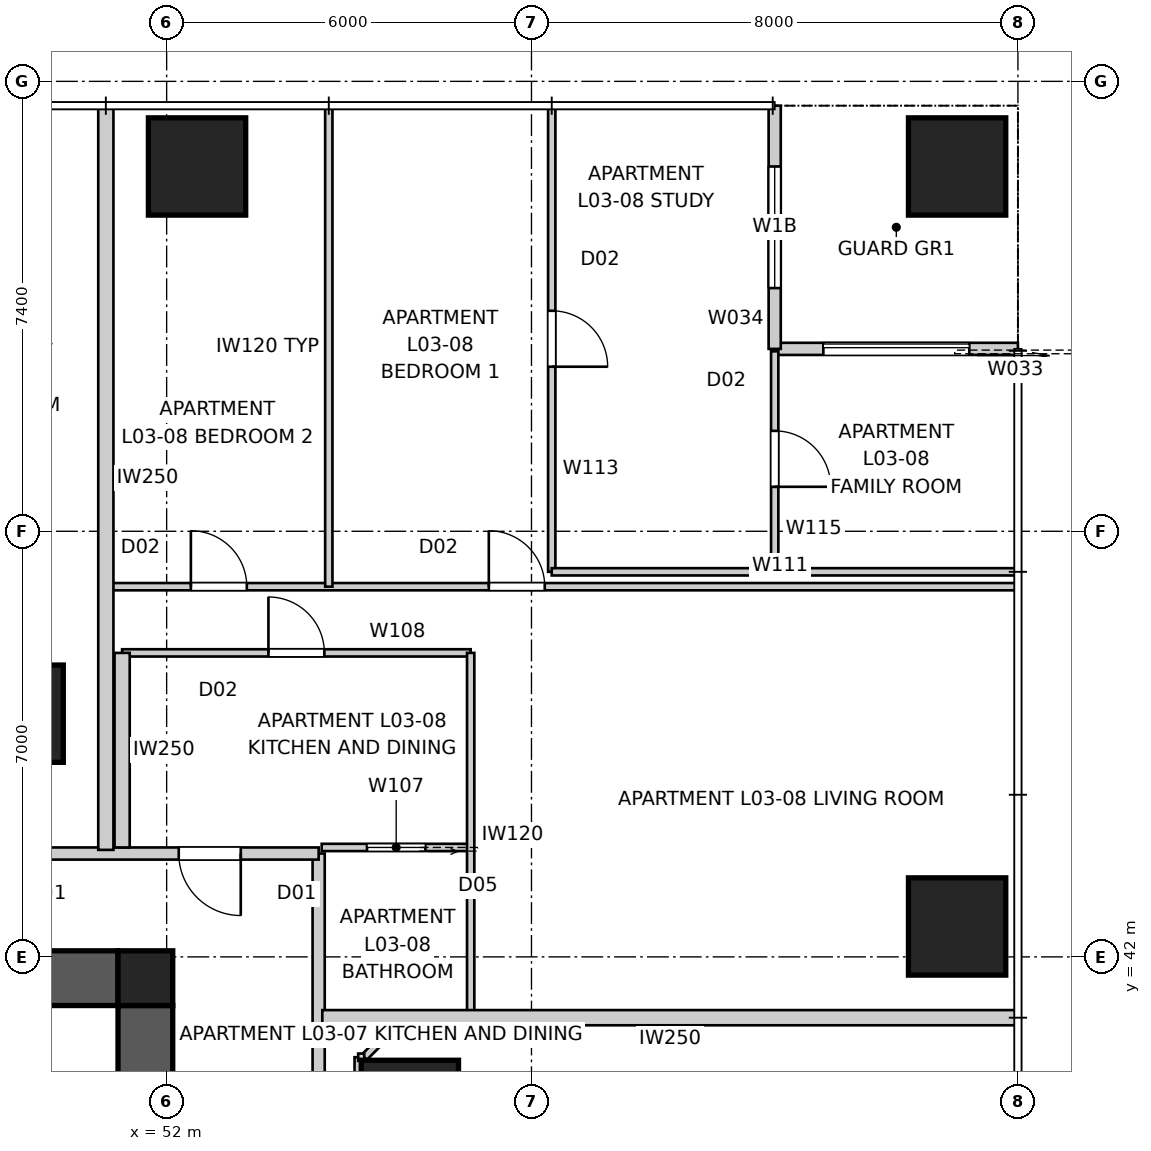
"""IFC4 building model, lengths in metres.
Left out: names, types, materials, properties, quantities, classifications, styles, units other than length and angle.
Written with IfcOpenShell. Run it as: python <this file> out.ifc"""

import sys

from ifc_helpers import new_model, si_unit, direction, frame, frame_2d, origin, origin_2d, place, context, subcontext, project, spatial, polyline, rectangle, outline, extrude, element, fill, save


model = new_model("IFC4")
c1 = context("Model", 3, precision=1e-05, world=origin(), true_north=direction((0.0, 1.0)))
c2 = subcontext(c1, "Body", "Model", "MODEL_VIEW")
j1 = project(units=[si_unit("LENGTHUNIT", "METRE"), si_unit("PLANEANGLEUNIT", "RADIAN")], contexts=[c1])
p1 = place(None, origin())
s1 = spatial("IfcSite", under=j1, at=p1, CompositionType="ELEMENT")
p2 = place(p1, origin())
s2 = spatial("IfcBuilding", under=s1, at=p2, CompositionType="ELEMENT")
p3 = place(p2, frame((0.0, 0.0, 15.0)))
s3 = spatial("IfcBuildingStorey", under=s2, at=p3, CompositionType="ELEMENT", Elevation=15.0)
p4 = place(p3, frame((28.8, 41.65, 0.0), z_axis=(0.0, 0.0, 1.0), x_axis=(1.0, 0.0, 0.0)))
e1 = element("IfcWall", 1, at=p4, inside=s3, PredefinedType="SHEAR", context=c2, shape_type="SweptSolid", body=[
    extrude(outline(polyline([(0.0, -0.45), (22.4, -0.45), (22.4, -0.025), (22.85, -0.025), (22.85, 0.025), (22.4, 0.025), (22.4, 0.45), (0.0, 0.45), (0.0, 0.025), (-0.45, 0.025), (-0.45, -0.025), (0.0, -0.025), (0.0, -0.45)])), origin(), (0.0, 0.0, 1.0), 3.4),
])
p5 = place(p3, frame((51.65, 18.8, 0.0), z_axis=(0.0, 0.0, 1.0), x_axis=(0.0, 1.0, 0.0)))
e2 = element("IfcWall", 2, at=p5, inside=s3, PredefinedType="SHEAR", context=c2, shape_type="SweptSolid", body=[
    extrude(outline(polyline([(0.0, -0.45), (22.4, -0.45), (22.4, -0.025), (22.85, -0.025), (22.85, 0.025), (22.4, 0.025), (22.4, 0.45), (0.0, 0.45), (0.0, 0.025), (-0.45, 0.025), (-0.45, -0.025), (0.0, -0.025), (0.0, -0.45)])), origin(), (0.0, 0.0, 1.0), 3.4),
])
p6 = place(p5, frame((11.14, 0.0, 0.0)))
e3 = element("IfcOpeningElement", 3, at=p6, cuts=e2, PredefinedType="OPENING", context=c2, shape_type="SweptSolid", body=[
    extrude(rectangle(XDim=1.02, YDim=2.4, at=frame_2d((0.51, 1.2))), frame((0.0, 0.46, 0.0), z_axis=(0.0, -1.0, 0.0), x_axis=(1.0, 0.0, 0.0)), (0.0, 0.0, 1.0), 0.92),
])
p7 = place(p3, frame((51.65, 41.65, 0.0), z_axis=(0.0, 0.0, 1.0), x_axis=(1.0, 0.0, 0.0)))
e4 = element("IfcColumn", 4, at=p7, inside=s3, PredefinedType="COLUMN", context=c2, shape_type="SweptSolid", body=[
    extrude(rectangle(XDim=0.9, YDim=0.9, at=origin_2d()), origin(), (0.0, 0.0, 1.0), 3.4),
])
for number, where, z_axis, x_axis in (
    (5, (65.0, 42.5, 0.0), (0.0, 0.0, 1.0), (1.0, 0.0, 0.0)),
    (6, (65.0, 55.0, 0.0), (0.0, 0.0, 1.0), (1.0, 0.0, 0.0)),
    (7, (52.5, 55.0, 0.0), (0.0, 0.0, 1.0), (1.0, 0.0, 0.0)),
    (8, (56.0, 39.5, 0.0), (0.0, 0.0, 1.0), (1.0, 0.0, 0.0)),
    (9, (49.5, 46.0, 0.0), (0.0, 0.0, 1.0), (1.0, 0.0, 0.0)),
):
    element("IfcColumn", number, at=place(p3, frame(where, z_axis=z_axis, x_axis=x_axis)), inside=s3, PredefinedType="COLUMN", context=c2, shape_type="SweptSolid", body=[
        extrude(rectangle(XDim=1.6, YDim=1.6, at=origin_2d()), origin(), (0.0, 0.0, 1.0), 3.4),
    ])
p8 = place(p3, frame((66.0, 52.0, 0.0), z_axis=(0.0, 0.0, 1.0), x_axis=(-1.0, 0.0, 0.0)))
e10 = element("IfcWall", 10, at=p8, inside=s3, PredefinedType="SOLIDWALL", context=c2, shape_type="SweptSolid", body=[
    extrude(rectangle(XDim=4.0, YDim=0.2, at=frame_2d((2.0, 0.0))), origin(), (0.0, 0.0, 1.0), 3.25),
])
p9 = place(p8, frame((0.8, 0.0, 0.0)))
e11 = element("IfcOpeningElement", 11, at=p9, cuts=e10, PredefinedType="OPENING", context=c2, shape_type="SweptSolid", body=[
    extrude(rectangle(XDim=2.4, YDim=2.1, at=frame_2d((1.2, 1.05))), frame((0.0, 0.11, 0.0), z_axis=(0.0, -1.0, 0.0), x_axis=(1.0, 0.0, 0.0)), (0.0, 0.0, 1.0), 0.22),
])
p10 = place(p3, frame((62.0, 52.0, 0.0), z_axis=(0.0, 0.0, 1.0), x_axis=(0.0, 1.0, 0.0)))
e12 = element("IfcWall", 12, at=p10, inside=s3, PredefinedType="SOLIDWALL", context=c2, shape_type="SweptSolid", body=[
    extrude(rectangle(XDim=4.0, YDim=0.2, at=frame_2d((2.0, 0.0))), origin(), (0.0, 0.0, 1.0), 3.25),
])
p11 = place(p10, frame((1.0, 0.0, 0.45)))
e13 = element("IfcOpeningElement", 13, at=p11, cuts=e12, PredefinedType="OPENING", context=c2, shape_type="SweptSolid", body=[
    extrude(rectangle(XDim=2.0, YDim=1.8, at=frame_2d((1.0, 0.9))), frame((0.0, 0.11, 0.0), z_axis=(0.0, -1.0, 0.0), x_axis=(1.0, 0.0, 0.0)), (0.0, 0.0, 1.0), 0.22),
])
p12 = place(p3, frame((54.5, 16.3, 0.0), z_axis=(0.0, 0.0, 1.0), x_axis=(0.0, 1.0, 0.0)))
e14 = element("IfcWall", 14, at=p12, inside=s3, PredefinedType="PARTITIONING", context=c2, shape_type="SweptSolid", body=[
    extrude(rectangle(XDim=27.4, YDim=0.2, at=frame_2d((13.7, 0.0))), origin(), (0.0, 0.0, 1.0), 3.25),
])
p13 = place(p12, frame((20.998, 0.0, 0.0)))
e15 = element("IfcOpeningElement", 15, at=p13, cuts=e14, PredefinedType="OPENING", context=c2, shape_type="SweptSolid", body=[
    extrude(rectangle(XDim=1.02, YDim=2.34, at=frame_2d((0.51, 1.17))), frame((0.0, 0.11, 0.0), z_axis=(0.0, -1.0, 0.0), x_axis=(1.0, 0.0, 0.0)), (0.0, 0.0, 1.0), 0.22),
])
p14 = place(p12, frame((11.119, 0.0, 0.0)))
e16 = element("IfcOpeningElement", 16, at=p14, cuts=e14, PredefinedType="OPENING", context=c2, shape_type="SweptSolid", body=[
    extrude(rectangle(XDim=1.02, YDim=2.34, at=frame_2d((0.51, 1.17))), frame((0.0, 0.11, 0.0), z_axis=(0.0, -1.0, 0.0), x_axis=(1.0, 0.0, 0.0)), (0.0, 0.0, 1.0), 0.22),
])
p15 = place(p12, frame((1.015, 0.0, 0.0)))
e17 = element("IfcOpeningElement", 17, at=p15, cuts=e14, PredefinedType="OPENING", context=c2, shape_type="SweptSolid", body=[
    extrude(rectangle(XDim=1.02, YDim=2.34, at=frame_2d((0.51, 1.17))), frame((0.0, 0.11, 0.0), z_axis=(0.0, -1.0, 0.0), x_axis=(1.0, 0.0, 0.0)), (0.0, 0.0, 1.0), 0.22),
])
p16 = place(p3, frame((54.5, 43.7, 0.0), z_axis=(0.0, 0.0, 1.0), x_axis=(-1.0, 0.0, 0.0)))
e18 = element("IfcWall", 18, at=p16, inside=s3, PredefinedType="PARTITIONING", context=c2, shape_type="SweptSolid", body=[
    extrude(rectangle(XDim=29.0, YDim=0.2, at=frame_2d((14.5, 0.0))), origin(), (0.0, 0.0, 1.0), 3.25),
])
p17 = place(p16, frame((22.253, 0.0, 0.0)))
e19 = element("IfcOpeningElement", 19, at=p17, cuts=e18, PredefinedType="OPENING", context=c2, shape_type="SweptSolid", body=[
    extrude(rectangle(XDim=1.02, YDim=2.34, at=frame_2d((0.51, 1.17))), frame((0.0, 0.11, 0.0), z_axis=(0.0, -1.0, 0.0), x_axis=(1.0, 0.0, 0.0)), (0.0, 0.0, 1.0), 0.22),
])
p18 = place(p16, frame((5.393, 0.0, 0.0)))
e20 = element("IfcOpeningElement", 20, at=p18, cuts=e18, PredefinedType="OPENING", context=c2, shape_type="SweptSolid", body=[
    extrude(rectangle(XDim=1.02, YDim=2.34, at=frame_2d((0.51, 1.17))), frame((0.0, 0.11, 0.0), z_axis=(0.0, -1.0, 0.0), x_axis=(1.0, 0.0, 0.0)), (0.0, 0.0, 1.0), 0.22),
])
p19 = place(p16, frame((1.281, 0.0, 0.0)))
e21 = element("IfcOpeningElement", 21, at=p19, cuts=e18, PredefinedType="OPENING", context=c2, shape_type="SweptSolid", body=[
    extrude(rectangle(XDim=1.02, YDim=2.34, at=frame_2d((0.51, 1.17))), frame((0.0, 0.11, 0.0), z_axis=(0.0, -1.0, 0.0), x_axis=(1.0, 0.0, 0.0)), (0.0, 0.0, 1.0), 0.22),
])
p20 = place(p3, frame((66.0, 41.0, 0.0), z_axis=(0.0, 0.0, 1.0), x_axis=(-1.0, 0.0, 0.0)))
e22 = element("IfcWall", 22, at=p20, inside=s3, PredefinedType="PARTITIONING", context=c2, shape_type="SweptSolid", body=[
    extrude(rectangle(XDim=11.44, YDim=0.25, at=frame_2d((5.72, 0.0))), origin(), (0.0, 0.0, 1.0), 3.25),
])
p21 = place(p3, frame((51.0, 56.0, 0.0), z_axis=(0.0, 0.0, 1.0), x_axis=(0.0, -1.0, 0.0)))
e23 = element("IfcWall", 23, at=p21, inside=s3, PredefinedType="PARTITIONING", context=c2, shape_type="SweptSolid", body=[
    extrude(rectangle(XDim=12.24, YDim=0.25, at=frame_2d((6.12, 0.0))), origin(), (0.0, 0.0, 1.0), 3.25),
])
p22 = place(p3, frame((55.9, 41.0, 0.0), z_axis=(0.0, 0.0, 1.0), x_axis=(-0.707106781187, -0.707106781187, 0.0)))
e24 = element("IfcWall", 24, at=p22, inside=s3, PredefinedType="PARTITIONING", context=c2, shape_type="SweptSolid", body=[
    extrude(rectangle(XDim=0.919, YDim=0.12, at=frame_2d((0.459, 0.0))), origin(), (0.0, 0.0, 1.0), 3.25),
])
p23 = place(p3, frame((55.15, 40.35, 0.0), z_axis=(0.0, 0.0, 1.0), x_axis=(0.0, -1.0, 0.0)))
e25 = element("IfcWall", 25, at=p23, inside=s3, PredefinedType="PARTITIONING", context=c2, shape_type="SweptSolid", body=[
    extrude(rectangle(XDim=1.7, YDim=0.12, at=frame_2d((0.85, 0.0))), origin(), (0.0, 0.0, 1.0), 3.25),
])
p24 = place(p3, frame((57.0, 43.8, 0.0), z_axis=(0.0, 0.0, 1.0), x_axis=(-1.0, 0.0, 0.0)))
e26 = element("IfcWall", 26, at=p24, inside=s3, PredefinedType="PARTITIONING", context=c2, shape_type="SweptSolid", body=[
    extrude(rectangle(XDim=2.45, YDim=0.12, at=frame_2d((1.225, 0.0))), origin(), (0.0, 0.0, 1.0), 3.25),
])
p25 = place(p24, frame((0.745, 0.0, 0.0)))
e27 = element("IfcOpeningElement", 27, at=p25, cuts=e26, PredefinedType="OPENING", context=c2, shape_type="SweptSolid", body=[
    extrude(rectangle(XDim=0.96, YDim=2.1, at=frame_2d((0.48, 1.05))), frame((0.0, 0.07, 0.0), z_axis=(0.0, -1.0, 0.0), x_axis=(1.0, 0.0, 0.0)), (0.0, 0.0, 1.0), 0.14),
])
p26 = place(p3, frame((51.268, 47.0, 0.0), z_axis=(0.0, 0.0, 1.0), x_axis=(1.0, 0.0, 0.0)))
e28 = element("IfcWall", 28, at=p26, inside=s3, PredefinedType="PARTITIONING", context=c2, shape_type="SweptSolid", body=[
    extrude(rectangle(XDim=5.732, YDim=0.12, at=frame_2d((2.866, 0.0))), origin(), (0.0, 0.0, 1.0), 3.25),
])
p27 = place(p26, frame((2.406, 0.0, 0.0)))
e29 = element("IfcOpeningElement", 29, at=p27, cuts=e28, PredefinedType="OPENING", context=c2, shape_type="SweptSolid", body=[
    extrude(rectangle(XDim=0.92, YDim=2.34, at=frame_2d((0.46, 1.17))), frame((0.0, 0.07, 0.0), z_axis=(0.0, -1.0, 0.0), x_axis=(1.0, 0.0, 0.0)), (0.0, 0.0, 1.0), 0.14),
])
p28 = place(p3, frame((57.0, 47.0, 0.0), z_axis=(0.0, 0.0, 1.0), x_axis=(0.0, -1.0, 0.0)))
e30 = element("IfcWall", 30, at=p28, inside=s3, PredefinedType="PARTITIONING", context=c2, shape_type="SweptSolid", body=[
    extrude(rectangle(XDim=6.0, YDim=0.12, at=frame_2d((3.0, 0.0))), origin(), (0.0, 0.0, 1.0), 3.25),
])
p29 = place(p3, frame((51.268, 43.8, 0.0), z_axis=(0.0, 0.0, 1.0), x_axis=(0.0, 1.0, 0.0)))
e31 = element("IfcWall", 31, at=p29, inside=s3, PredefinedType="PARTITIONING", context=c2, shape_type="SweptSolid", body=[
    extrude(rectangle(XDim=3.2, YDim=0.25, at=frame_2d((1.6, 0.0))), origin(), (0.0, 0.0, 1.0), 3.25),
])
p30 = place(p3, frame((51.0, 48.089, 0.0), z_axis=(0.0, 0.0, 1.0), x_axis=(1.0, 0.0, 0.0)))
e32 = element("IfcWall", 32, at=p30, inside=s3, PredefinedType="PARTITIONING", context=c2, shape_type="SweptSolid", body=[
    extrude(rectangle(XDim=14.96, YDim=0.12, at=frame_2d((7.48, 0.0))), origin(), (0.0, 0.0, 1.0), 3.25),
])
p31 = place(p30, frame((6.298, 0.0, 0.0)))
e33 = element("IfcOpeningElement", 33, at=p31, cuts=e32, PredefinedType="OPENING", context=c2, shape_type="SweptSolid", body=[
    extrude(rectangle(XDim=0.92, YDim=2.34, at=frame_2d((0.46, 1.17))), frame((0.0, 0.07, 0.0), z_axis=(0.0, -1.0, 0.0), x_axis=(1.0, 0.0, 0.0)), (0.0, 0.0, 1.0), 0.14),
])
p32 = place(p30, frame((1.398, 0.0, 0.0)))
e34 = element("IfcOpeningElement", 34, at=p32, cuts=e32, PredefinedType="OPENING", context=c2, shape_type="SweptSolid", body=[
    extrude(rectangle(XDim=0.92, YDim=2.34, at=frame_2d((0.46, 1.17))), frame((0.0, 0.07, 0.0), z_axis=(0.0, -1.0, 0.0), x_axis=(1.0, 0.0, 0.0)), (0.0, 0.0, 1.0), 0.14),
])
p33 = place(p3, frame((54.667, 48.089, 0.0), z_axis=(0.0, 0.0, 1.0), x_axis=(0.0, 1.0, 0.0)))
e35 = element("IfcWall", 35, at=p33, inside=s3, PredefinedType="PARTITIONING", context=c2, shape_type="SweptSolid", body=[
    extrude(rectangle(XDim=7.871, YDim=0.12, at=frame_2d((3.936, 0.0))), origin(), (0.0, 0.0, 1.0), 2.637),
])
p34 = place(p3, frame((58.333, 55.96, 0.0), z_axis=(0.0, 0.0, 1.0), x_axis=(0.0, -1.0, 0.0)))
e36 = element("IfcWall", 36, at=p34, inside=s3, PredefinedType="PARTITIONING", context=c2, shape_type="SweptSolid", body=[
    extrude(rectangle(XDim=7.627, YDim=0.12, at=frame_2d((3.813, 0.0))), origin(), (0.0, 0.0, 1.0), 3.25),
])
p35 = place(p34, frame((3.333, 0.0, 0.0)))
e37 = element("IfcOpeningElement", 37, at=p35, cuts=e36, PredefinedType="OPENING", context=c2, shape_type="SweptSolid", body=[
    extrude(rectangle(XDim=0.92, YDim=2.34, at=frame_2d((0.46, 1.17))), frame((0.0, 0.07, 0.0), z_axis=(0.0, -1.0, 0.0), x_axis=(1.0, 0.0, 0.0)), (0.0, 0.0, 1.0), 0.14),
])
p36 = place(p3, frame((58.333, 48.333, 0.0), z_axis=(0.0, 0.0, 1.0), x_axis=(1.0, 0.0, 0.0)))
e38 = element("IfcWall", 38, at=p36, inside=s3, PredefinedType="PARTITIONING", context=c2, shape_type="SweptSolid", body=[
    extrude(rectangle(XDim=7.627, YDim=0.12, at=frame_2d((3.813, 0.0))), origin(), (0.0, 0.0, 1.0), 3.25),
])
p37 = place(p3, frame((62.0, 51.96, 0.0), z_axis=(0.0, 0.0, 1.0), x_axis=(0.0, -1.0, 0.0)))
e39 = element("IfcWall", 39, at=p37, inside=s3, PredefinedType="PARTITIONING", context=c2, shape_type="SweptSolid", body=[
    extrude(rectangle(XDim=3.627, YDim=0.12, at=frame_2d((1.813, 0.0))), origin(), (0.0, 0.0, 1.0), 3.25),
])
p38 = place(p37, frame((1.308, 0.0, 0.0)))
e40 = element("IfcOpeningElement", 40, at=p38, cuts=e39, PredefinedType="OPENING", context=c2, shape_type="SweptSolid", body=[
    extrude(rectangle(XDim=0.92, YDim=2.34, at=frame_2d((0.46, 1.17))), frame((0.0, 0.07, 0.0), z_axis=(0.0, -1.0, 0.0), x_axis=(1.0, 0.0, 0.0)), (0.0, 0.0, 1.0), 0.14),
])
p39 = place(p3, frame((55.15, 40.35, 0.0), z_axis=(0.0, 0.0, 1.0), x_axis=(1.0, 0.0, 0.0)))
e41 = element("IfcWall", 41, at=p39, inside=s3, PredefinedType="PARTITIONING", context=c2, shape_type="SweptSolid", body=[
    extrude(rectangle(XDim=0.1, YDim=0.12, at=frame_2d((0.05, 0.0))), origin(), (0.0, 0.0, 1.0), 3.25),
])
p40 = place(p9, origin())
e42 = element("IfcDoor", 42, at=p40, inside=s3, OperationType="SLIDING_TO_LEFT", PredefinedType="DOOR", context=c2, shape_type="SweptSolid", body=[
    extrude(rectangle(XDim=2.4, YDim=2.1, at=frame_2d((1.2, 1.05))), frame((0.0, 0.025, 0.0), z_axis=(0.0, -1.0, 0.0), x_axis=(1.0, 0.0, 0.0)), (0.0, 0.0, 1.0), 0.05),
])
fill(e11, e42)
p41 = place(p11, origin())
e43 = element("IfcWindow", 43, at=p41, inside=s3, PartitioningType="SINGLE_PANEL", PredefinedType="WINDOW", context=c2, shape_type="SweptSolid", body=[
    extrude(rectangle(XDim=2.0, YDim=1.8, at=frame_2d((1.0, 0.9))), frame((0.0, 0.03, 0.0), z_axis=(0.0, -1.0, 0.0), x_axis=(1.0, 0.0, 0.0)), (0.0, 0.0, 1.0), 0.06),
])
fill(e13, e43)
p42 = place(p19, origin())
e44 = element("IfcDoor", 44, at=p42, inside=s3, OperationType="SINGLE_SWING_LEFT", PredefinedType="DOOR", context=c2, shape_type="SweptSolid", body=[
    extrude(rectangle(XDim=1.02, YDim=2.34, at=frame_2d((0.51, 1.17))), frame((0.0, 0.025, 0.0), z_axis=(0.0, -1.0, 0.0), x_axis=(1.0, 0.0, 0.0)), (0.0, 0.0, 1.0), 0.05),
])
fill(e21, e44)
p43 = place(p27, origin())
e45 = element("IfcDoor", 45, at=p43, inside=s3, OperationType="SINGLE_SWING_LEFT", PredefinedType="DOOR", context=c2, shape_type="SweptSolid", body=[
    extrude(rectangle(XDim=0.92, YDim=2.34, at=frame_2d((0.46, 1.17))), frame((0.0, 0.025, 0.0), z_axis=(0.0, -1.0, 0.0), x_axis=(1.0, 0.0, 0.0)), (0.0, 0.0, 1.0), 0.05),
])
fill(e29, e45)
p44 = place(p25, origin())
e46 = element("IfcDoor", 46, at=p44, inside=s3, OperationType="SLIDING_TO_LEFT", PredefinedType="DOOR", context=c2, shape_type="SweptSolid", body=[
    extrude(rectangle(XDim=0.96, YDim=2.1, at=frame_2d((0.48, 1.05))), frame((0.0, 0.025, 0.0), z_axis=(0.0, -1.0, 0.0), x_axis=(1.0, 0.0, 0.0)), (0.0, 0.0, 1.0), 0.05),
])
fill(e27, e46)
p45 = place(p31, origin())
e47 = element("IfcDoor", 47, at=p45, inside=s3, OperationType="SINGLE_SWING_LEFT", PredefinedType="DOOR", context=c2, shape_type="SweptSolid", body=[
    extrude(rectangle(XDim=0.92, YDim=2.34, at=frame_2d((0.46, 1.17))), frame((0.0, 0.025, 0.0), z_axis=(0.0, -1.0, 0.0), x_axis=(1.0, 0.0, 0.0)), (0.0, 0.0, 1.0), 0.05),
])
fill(e33, e47)
p46 = place(p32, origin())
e48 = element("IfcDoor", 48, at=p46, inside=s3, OperationType="SINGLE_SWING_LEFT", PredefinedType="DOOR", context=c2, shape_type="SweptSolid", body=[
    extrude(rectangle(XDim=0.92, YDim=2.34, at=frame_2d((0.46, 1.17))), frame((0.0, 0.025, 0.0), z_axis=(0.0, -1.0, 0.0), x_axis=(1.0, 0.0, 0.0)), (0.0, 0.0, 1.0), 0.05),
])
fill(e34, e48)
p47 = place(p35, origin())
e49 = element("IfcDoor", 49, at=p47, inside=s3, OperationType="SINGLE_SWING_RIGHT", PredefinedType="DOOR", context=c2, shape_type="SweptSolid", body=[
    extrude(rectangle(XDim=0.92, YDim=2.34, at=frame_2d((0.46, 1.17))), frame((0.0, 0.025, 0.0), z_axis=(0.0, -1.0, 0.0), x_axis=(1.0, 0.0, 0.0)), (0.0, 0.0, 1.0), 0.05),
])
fill(e37, e49)
p48 = place(p38, origin())
e50 = element("IfcDoor", 50, at=p48, inside=s3, OperationType="SINGLE_SWING_RIGHT", PredefinedType="DOOR", context=c2, shape_type="SweptSolid", body=[
    extrude(rectangle(XDim=0.92, YDim=2.34, at=frame_2d((0.46, 1.17))), frame((0.0, 0.025, 0.0), z_axis=(0.0, -1.0, 0.0), x_axis=(1.0, 0.0, 0.0)), (0.0, 0.0, 1.0), 0.05),
])
fill(e40, e50)
save(model, sys.argv[1])
